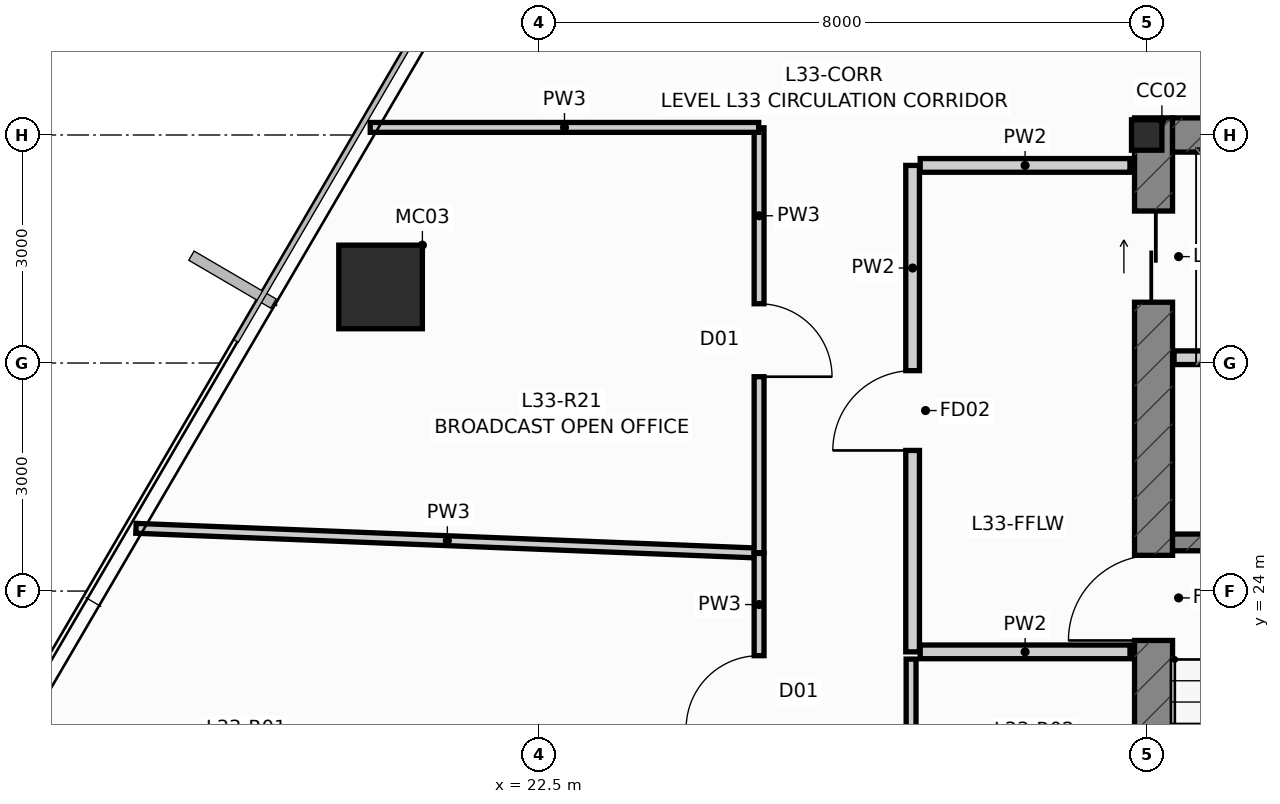
"""IFC4 building model, lengths in metres.
Left out: names, types, materials, properties, quantities, classifications, styles, units other than length and angle.
Written with IfcOpenShell. Run it as: python <this file> out.ifc"""

import sys

from ifc_helpers import new_model, si_unit, direction, frame, frame_2d, origin, origin_2d, place, context, subcontext, project, spatial, rectangle, hollow_rectangle, i_section, extrude, source, transform, mapped, element, fill, save


model = new_model("IFC4")
c1 = context("Model", 3, precision=1e-05, world=origin(), true_north=direction((0.0, 1.0)))
c2 = subcontext(c1, "Body", "Model", "MODEL_VIEW")
j1 = project(units=[si_unit("LENGTHUNIT", "METRE"), si_unit("PLANEANGLEUNIT", "RADIAN")], contexts=[c1])
p1 = place(None, origin())
s1 = spatial("IfcSite", under=j1, at=p1, CompositionType="ELEMENT")
p2 = place(p1, origin())
s2 = spatial("IfcBuilding", under=s1, at=p2, CompositionType="ELEMENT")
p3 = place(p2, frame((0.0, 0.0, 127.3)))
s3 = spatial("IfcBuildingStorey", under=s2, at=p3, CompositionType="ELEMENT", Elevation=127.3)
m1 = source(origin(), c2, "Body", "SweptSolid", [
    extrude(i_section(OverallWidth=0.4, OverallDepth=0.4, WebThickness=0.02, FlangeThickness=0.032, at=origin_2d()), origin(), (0.0, 0.0, 1.0), 4.5),
])
p4 = place(p3, frame((30.5, 30.0, 0.0), z_axis=(0.0, 0.0, 1.0), x_axis=(1.0, 0.0, 0.0)))
e1 = element("IfcColumn", 1, at=p4, inside=s3, PredefinedType="COLUMN", context=c2, shape_type="MappedRepresentation", body=[
    mapped(m1, transform((0.0, 0.0, 0.0), scale=1.0)),
])
p5 = place(p3, frame((30.59, 16.95, 0.0), z_axis=(0.0, 0.0, 1.0), x_axis=(0.0, 1.0, 0.0)))
e2 = element("IfcWall", 2, at=p5, inside=s3, PredefinedType="SHEAR", context=c2, shape_type="SweptSolid", body=[
    extrude(rectangle(XDim=13.275, YDim=0.5, at=frame_2d((6.638, 0.0))), origin(), (0.0, 0.0, 1.0), 4.5),
])
p6 = place(p5, frame((6.4, 0.0, 0.0)))
e3 = element("IfcOpeningElement", 3, at=p6, cuts=e2, PredefinedType="OPENING", context=c2, shape_type="SweptSolid", body=[
    extrude(rectangle(XDim=1.12, YDim=2.15, at=frame_2d((0.56, 1.075))), frame((0.0, 0.262, 0.0), z_axis=(0.0, -1.0, 0.0), x_axis=(1.0, 0.0, 0.0)), (0.0, 0.0, 1.0), 0.524),
])
p7 = place(p5, frame((10.85, 0.0, 0.0)))
e4 = element("IfcOpeningElement", 4, at=p7, cuts=e2, PredefinedType="OPENING", context=c2, shape_type="SweptSolid", body=[
    extrude(rectangle(XDim=1.2, YDim=2.2, at=frame_2d((0.6, 1.1))), frame((0.0, 0.262, 0.0), z_axis=(0.0, -1.0, 0.0), x_axis=(1.0, 0.0, 0.0)), (0.0, 0.0, 1.0), 0.524),
])
p8 = place(p3, frame((30.84, 30.0, 0.0), z_axis=(0.0, 0.0, 1.0), x_axis=(1.0, 0.0, 0.0)))
e5 = element("IfcWall", 5, at=p8, inside=s3, PredefinedType="SHEAR", context=c2, shape_type="SweptSolid", body=[
    extrude(rectangle(XDim=2.9, YDim=0.45, at=frame_2d((1.45, 0.0))), origin(), (0.0, 0.0, 1.0), 4.5),
])
p9 = place(p3, frame((30.84, 24.64, 0.0), z_axis=(0.0, 0.0, 1.0), x_axis=(1.0, 0.0, 0.0)))
e6 = element("IfcWall", 6, at=p9, inside=s3, PredefinedType="SHEAR", context=c2, shape_type="SweptSolid", body=[
    extrude(rectangle(XDim=2.9, YDim=0.22, at=frame_2d((1.45, 0.0))), origin(), (0.0, 0.0, 1.0), 4.5),
])
m2 = source(origin(), c2, "Body", "SweptSolid", [
    extrude(hollow_rectangle(XDim=1.1, YDim=1.1, WallThickness=0.06, at=origin_2d()), origin(), (0.0, 0.0, 1.0), 4.501),
])
p10 = place(p3, frame((20.42, 28.001, 0.0), z_axis=(0.01491662865, -0.013777540644, 0.999793815526), x_axis=(0.678501966239, 0.734598585494, 0.0)))
e7 = element("IfcColumn", 7, at=p10, inside=s3, PredefinedType="COLUMN", context=c2, shape_type="MappedRepresentation", body=[
    mapped(m2, transform((0.0, 0.0, 0.0), scale=1.0)),
])
p11 = place(p3, frame((27.42, 23.2, 0.0), z_axis=(0.0, 0.0, 1.0), x_axis=(0.0, 1.0, 0.0)))
e8 = element("IfcWall", 8, at=p11, inside=s3, PredefinedType="PARTITIONING", context=c2, shape_type="SweptSolid", body=[
    extrude(rectangle(XDim=6.4, YDim=0.18, at=frame_2d((3.2, 0.0))), origin(), (0.0, 0.0, 1.0), 3.928),
])
p12 = place(p11, frame((2.65, 0.0, 0.0)))
e9 = element("IfcOpeningElement", 9, at=p12, cuts=e8, PredefinedType="OPENING", context=c2, shape_type="SweptSolid", body=[
    extrude(rectangle(XDim=1.05, YDim=2.15, at=frame_2d((0.525, 1.075))), frame((0.0, 0.102, 0.0), z_axis=(0.0, -1.0, 0.0), x_axis=(1.0, 0.0, 0.0)), (0.0, 0.0, 1.0), 0.204),
])
p13 = place(p3, frame((27.52, 23.2, 0.0), z_axis=(0.0, 0.0, 1.0), x_axis=(1.0, 0.0, 0.0)))
e10 = element("IfcWall", 10, at=p13, inside=s3, PredefinedType="PARTITIONING", context=c2, shape_type="SweptSolid", body=[
    extrude(rectangle(XDim=2.76, YDim=0.18, at=frame_2d((1.38, 0.0))), origin(), (0.0, 0.0, 1.0), 4.25),
])
p14 = place(p3, frame((27.52, 29.6, 0.0), z_axis=(0.0, 0.0, 1.0), x_axis=(1.0, 0.0, 0.0)))
e11 = element("IfcWall", 11, at=p14, inside=s3, PredefinedType="PARTITIONING", context=c2, shape_type="SweptSolid", body=[
    extrude(rectangle(XDim=2.76, YDim=0.18, at=frame_2d((1.38, 0.0))), origin(), (0.0, 0.0, 1.0), 3.775),
])
p15 = place(p3, frame((30.86, 27.07, 0.0), z_axis=(0.0, 0.0, 1.0), x_axis=(1.0, 0.0, 0.0)))
e12 = element("IfcWall", 12, at=p15, inside=s3, PredefinedType="PARTITIONING", context=c2, shape_type="SweptSolid", body=[
    extrude(rectangle(XDim=2.9, YDim=0.18, at=frame_2d((1.45, 0.0))), origin(), (0.0, 0.0, 1.0), 4.25),
])
p16 = place(p3, frame((17.202, 24.825, 0.0), z_axis=(0.0, 0.0, 1.0), x_axis=(0.999212049852, -0.039689789995, 0.0)))
e13 = element("IfcWall", 13, at=p16, inside=s3, PredefinedType="PARTITIONING", context=c2, shape_type="SweptSolid", body=[
    extrude(rectangle(XDim=8.199, YDim=0.13, at=frame_2d((4.1, 0.0))), origin(), (0.0, 0.0, 1.0), 4.25),
])
p17 = place(p3, frame((25.4, 30.095, 0.0), z_axis=(0.0, 0.0, 1.0), x_axis=(0.0, -1.0, 0.0)))
e14 = element("IfcWall", 14, at=p17, inside=s3, PredefinedType="PARTITIONING", context=c2, shape_type="SweptSolid", body=[
    extrude(rectangle(XDim=5.59, YDim=0.13, at=frame_2d((2.795, 0.0))), origin(), (0.0, 0.0, 1.0), 3.928),
])
p18 = place(p17, frame((2.315, 0.0, 0.0)))
e15 = element("IfcOpeningElement", 15, at=p18, cuts=e14, PredefinedType="OPENING", context=c2, shape_type="SweptSolid", body=[
    extrude(rectangle(XDim=0.96, YDim=2.15, at=frame_2d((0.48, 1.075))), frame((0.0, 0.077, 0.0), z_axis=(0.0, -1.0, 0.0), x_axis=(1.0, 0.0, 0.0)), (0.0, 0.0, 1.0), 0.154),
])
p19 = place(p3, frame((27.4, 17.775, 0.0), z_axis=(0.0, 0.0, 1.0), x_axis=(0.0, 1.0, 0.0)))
e16 = element("IfcWall", 16, at=p19, inside=s3, PredefinedType="PARTITIONING", context=c2, shape_type="SweptSolid", body=[
    extrude(rectangle(XDim=5.33, YDim=0.13, at=frame_2d((2.665, 0.0))), origin(), (0.0, 0.0, 1.0), 4.25),
])
p20 = place(p19, frame((2.185, 0.0, 0.0)))
e17 = element("IfcOpeningElement", 17, at=p20, cuts=e16, PredefinedType="OPENING", context=c2, shape_type="SweptSolid", body=[
    extrude(rectangle(XDim=0.96, YDim=2.15, at=frame_2d((0.48, 1.075))), frame((0.0, 0.077, 0.0), z_axis=(0.0, -1.0, 0.0), x_axis=(1.0, 0.0, 0.0)), (0.0, 0.0, 1.0), 0.154),
])
p21 = place(p3, frame((20.284, 30.1, 0.0), z_axis=(0.0, 0.0, 1.0), x_axis=(1.0, 0.0, 0.0)))
e18 = element("IfcWall", 18, at=p21, inside=s3, PredefinedType="PARTITIONING", context=c2, shape_type="SweptSolid", body=[
    extrude(rectangle(XDim=5.111, YDim=0.13, at=frame_2d((2.556, 0.0))), origin(), (0.0, 0.0, 1.0), 4.25),
])
p22 = place(p3, frame((25.4, 20.845, 0.0), z_axis=(0.0, 0.0, 1.0), x_axis=(0.0, 1.0, 0.0)))
e19 = element("IfcWall", 19, at=p22, inside=s3, PredefinedType="PARTITIONING", context=c2, shape_type="SweptSolid", body=[
    extrude(rectangle(XDim=3.65, YDim=0.13, at=frame_2d((1.825, 0.0))), origin(), (0.0, 0.0, 1.0), 3.928),
])
p23 = place(p22, frame((1.345, 0.0, 0.0)))
e20 = element("IfcOpeningElement", 20, at=p23, cuts=e19, PredefinedType="OPENING", context=c2, shape_type="SweptSolid", body=[
    extrude(rectangle(XDim=0.96, YDim=2.15, at=frame_2d((0.48, 1.075))), frame((0.0, 0.077, 0.0), z_axis=(0.0, -1.0, 0.0), x_axis=(1.0, 0.0, 0.0)), (0.0, 0.0, 1.0), 0.154),
])
p24 = place(p6, origin())
e21 = element("IfcDoor", 21, at=p24, inside=s3, OperationType="SINGLE_SWING_LEFT", PredefinedType="DOOR", context=c2, shape_type="SweptSolid", body=[
    extrude(rectangle(XDim=1.12, YDim=2.15, at=frame_2d((0.56, 1.075))), frame((0.0, 0.025, 0.0), z_axis=(0.0, -1.0, 0.0), x_axis=(1.0, 0.0, 0.0)), (0.0, 0.0, 1.0), 0.05),
])
fill(e3, e21)
p25 = place(p7, origin())
e22 = element("IfcDoor", 22, at=p25, inside=s3, OperationType="SLIDING_TO_LEFT", PredefinedType="DOOR", context=c2, shape_type="SweptSolid", body=[
    extrude(rectangle(XDim=1.2, YDim=2.2, at=frame_2d((0.6, 1.1))), frame((0.0, 0.025, 0.0), z_axis=(0.0, -1.0, 0.0), x_axis=(1.0, 0.0, 0.0)), (0.0, 0.0, 1.0), 0.05),
])
fill(e4, e22)
p26 = place(p12, origin())
e23 = element("IfcDoor", 23, at=p26, inside=s3, OperationType="SINGLE_SWING_LEFT", PredefinedType="DOOR", context=c2, shape_type="SweptSolid", body=[
    extrude(rectangle(XDim=1.05, YDim=2.15, at=frame_2d((0.525, 1.075))), frame((0.0, 0.025, 0.0), z_axis=(0.0, -1.0, 0.0), x_axis=(1.0, 0.0, 0.0)), (0.0, 0.0, 1.0), 0.05),
])
fill(e9, e23)
p27 = place(p18, origin())
e24 = element("IfcDoor", 24, at=p27, inside=s3, OperationType="SINGLE_SWING_RIGHT", PredefinedType="DOOR", context=c2, shape_type="SweptSolid", body=[
    extrude(rectangle(XDim=0.96, YDim=2.15, at=frame_2d((0.48, 1.075))), frame((0.0, 0.025, 0.0), z_axis=(0.0, -1.0, 0.0), x_axis=(1.0, 0.0, 0.0)), (0.0, 0.0, 1.0), 0.05),
])
fill(e15, e24)
p28 = place(p23, origin())
e25 = element("IfcDoor", 25, at=p28, inside=s3, OperationType="SINGLE_SWING_LEFT", PredefinedType="DOOR", context=c2, shape_type="SweptSolid", body=[
    extrude(rectangle(XDim=0.96, YDim=2.15, at=frame_2d((0.48, 1.075))), frame((0.0, 0.025, 0.0), z_axis=(0.0, -1.0, 0.0), x_axis=(1.0, 0.0, 0.0)), (0.0, 0.0, 1.0), 0.05),
])
fill(e20, e25)
save(model, sys.argv[1])
